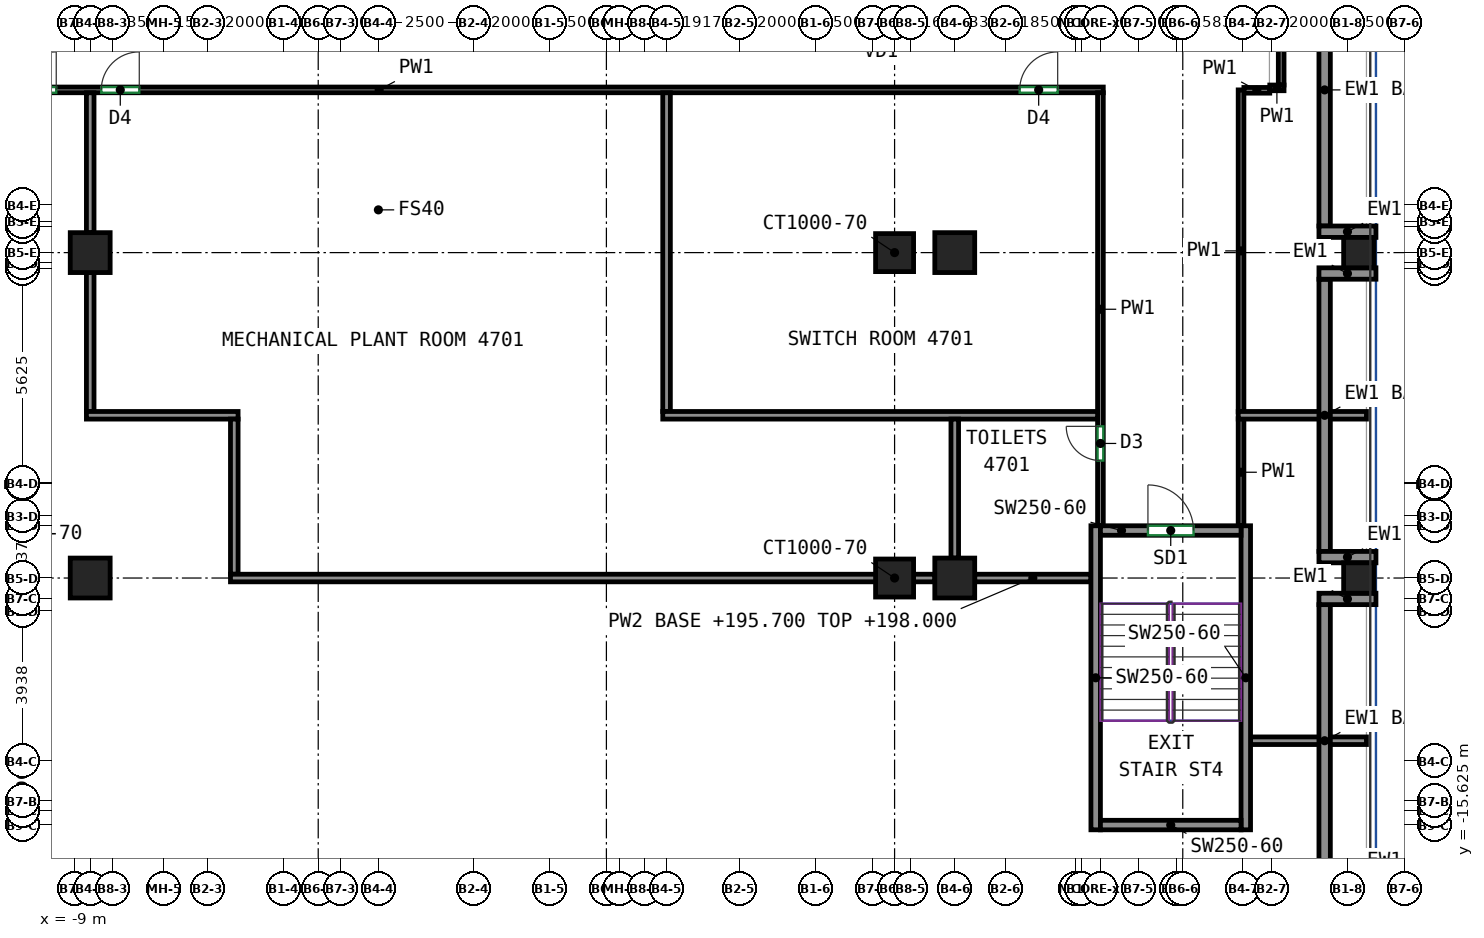
"""IFC4 building model, lengths in metres.
Left out: names, types, materials, properties, quantities, classifications, styles, units other than length and angle.
Written with IfcOpenShell. Run it as: python <this file> out.ifc"""

import sys

from ifc_helpers import new_model, si_unit, direction, frame, frame_2d, origin, origin_2d, place, context, subcontext, project, spatial, rectangle, extrude, source, transform, mapped, element, fill, save


model = new_model("IFC4")
c1 = context("Model", 3, precision=1e-05, world=origin(), true_north=direction((0.0, 1.0)))
c2 = subcontext(c1, "Body", "Model", "MODEL_VIEW")
j1 = project(units=[si_unit("LENGTHUNIT", "METRE"), si_unit("PLANEANGLEUNIT", "RADIAN")], contexts=[c1])
p1 = place(None, origin())
s1 = spatial("IfcSite", under=j1, at=p1, CompositionType="ELEMENT")
p2 = place(p1, origin())
s2 = spatial("IfcBuilding", under=s1, at=p2, CompositionType="ELEMENT")
p3 = place(p2, frame((0.0, 0.0, 195.7)))
s3 = spatial("IfcBuildingStorey", under=s2, at=p3, CompositionType="ELEMENT", Elevation=195.7)
m1 = source(origin(), c2, "Body", "SweptSolid", [
    extrude(rectangle(XDim=1.05, YDim=1.05, at=origin_2d()), origin(), (0.0, 0.0, 1.0), 2.3),
])
for number, where, z_axis, x_axis in (
    (1, (-8.583, -9.125, 0.0), (0.0, 0.0, 1.0), (1.0, 0.0, 0.0)),
    (2, (-8.583, -0.562, 0.0), (0.0, 0.0, 1.0), (1.0, 0.0, 0.0)),
    (3, (14.167, -9.125, 0.0), (0.0, 0.0, 1.0), (1.0, 0.0, 0.0)),
    (4, (14.167, -0.562, 0.0), (0.0, 0.0, 1.0), (1.0, 0.0, 0.0)),
):
    element("IfcColumn", number, at=place(p3, frame(where, z_axis=z_axis, x_axis=x_axis)), inside=s3, PredefinedType="COLUMN", context=c2, shape_type="MappedRepresentation", body=[
        mapped(m1, transform((0.0, 0.0, 0.0))),
    ])
m2 = source(origin(), c2, "Body", "SweptSolid", [
    extrude(rectangle(XDim=0.8, YDim=0.8, at=origin_2d()), origin(), (0.0, 0.0, 1.0), 2.3),
])
for number, where, z_axis, x_axis in (
    (5, (24.8, -9.125, 0.0), (0.0, 0.0, 1.0), (1.0, 0.0, 0.0)),
    (6, (24.8, -0.562, 0.0), (0.0, 0.0, 1.0), (1.0, 0.0, 0.0)),
):
    element("IfcColumn", number, at=place(p3, frame(where, z_axis=z_axis, x_axis=x_axis)), inside=s3, PredefinedType="COLUMN", context=c2, shape_type="MappedRepresentation", body=[
        mapped(m2, transform((0.0, 0.0, 0.0))),
    ])
m3 = source(origin(), c2, "Body", "SweptSolid", [
    extrude(rectangle(XDim=1.0, YDim=1.0, at=origin_2d()), origin(), (0.0, 0.0, 1.0), 3.8),
])
for number, where, z_axis, x_axis in (
    (7, (12.583, -9.125, 0.0), (0.0, 0.0, 1.0), (1.0, 0.0, 0.0)),
    (8, (12.583, -0.562, 0.0), (0.0, 0.0, 1.0), (1.0, 0.0, 0.0)),
):
    element("IfcColumn", number, at=place(p3, frame(where, z_axis=z_axis, x_axis=x_axis)), inside=s3, PredefinedType="COLUMN", context=c2, shape_type="MappedRepresentation", body=[
        mapped(m3, transform((0.0, 0.0, 0.0))),
    ])
m4 = source(origin(), c2, "Body", "SweptSolid", [
    extrude(rectangle(XDim=8.0, YDim=0.25, at=frame_2d((4.0, 0.0))), origin(), (0.0, 0.0, 1.0), 3.8),
])
for number, where, z_axis, x_axis in (
    (9, (17.875, -15.75, 0.0), (0.0, 0.0, 1.0), (0.0, 1.0, 0.0)),
    (10, (21.825, -15.75, 0.0), (0.0, 0.0, 1.0), (0.0, 1.0, 0.0)),
):
    element("IfcWall", number, at=place(p3, frame(where, z_axis=z_axis, x_axis=x_axis)), inside=s3, PredefinedType="SHEAR", context=c2, shape_type="MappedRepresentation", body=[
        mapped(m4, transform((0.0, 0.0, 0.0))),
    ])
m5 = source(origin(), c2, "Body", "SweptSolid", [
    extrude(rectangle(XDim=3.7, YDim=0.25, at=frame_2d((1.85, 0.0))), origin(), (0.0, 0.0, 1.0), 3.8),
])
p4 = place(p3, frame((18.0, -15.625, 0.0), z_axis=(0.0, 0.0, 1.0), x_axis=(1.0, 0.0, 0.0)))
e11 = element("IfcWall", 11, at=p4, inside=s3, PredefinedType="SHEAR", context=c2, shape_type="MappedRepresentation", body=[
    mapped(m5, transform((0.0, 0.0, 0.0))),
])
p5 = place(p3, frame((18.0, -7.875, 0.0), z_axis=(0.0, 0.0, 1.0), x_axis=(1.0, 0.0, 0.0)))
e12 = element("IfcWall", 12, at=p5, inside=s3, PredefinedType="SHEAR", context=c2, shape_type="MappedRepresentation", body=[
    mapped(m5, transform((0.0, 0.0, 0.0))),
])
p6 = place(p5, frame((1.25, 0.0, 0.0)))
e13 = element("IfcOpeningElement", 13, at=p6, cuts=e12, PredefinedType="OPENING", context=c2, shape_type="SweptSolid", body=[
    extrude(rectangle(XDim=1.2, YDim=2.1, at=frame_2d((0.6, 1.05))), frame((0.0, 0.135, 0.0), z_axis=(0.0, -1.0, 0.0), x_axis=(1.0, 0.0, 0.0)), (0.0, 0.0, 1.0), 0.27),
])
m6 = source(origin(), c2, "Body", "SweptSolid", [
    extrude(rectangle(XDim=7.163, YDim=0.3, at=frame_2d((3.581, 0.0))), origin(), (0.0, 0.0, 1.0), 1.1),
])
p7 = place(p3, frame((23.9, -16.988, 0.0), z_axis=(0.0, 0.0, 1.0), x_axis=(0.0, 1.0, 0.0)))
e14 = element("IfcWall", 14, at=p7, inside=s3, PredefinedType="SOLIDWALL", context=c2, shape_type="MappedRepresentation", body=[
    mapped(m6, transform((0.0, 0.0, 0.0))),
])
m7 = source(origin(), c2, "Body", "SweptSolid", [
    extrude(rectangle(XDim=1.5, YDim=0.3, at=frame_2d((0.75, 0.0))), origin(), (0.0, 0.0, 1.0), 2.3),
])
p8 = place(p3, frame((25.25, -9.675, 0.0), z_axis=(0.0, 0.0, 1.0), x_axis=(-1.0, 0.0, 0.0)))
e15 = element("IfcWall", 15, at=p8, inside=s3, PredefinedType="SOLIDWALL", context=c2, shape_type="MappedRepresentation", body=[
    mapped(m7, transform((0.0, 0.0, 0.0))),
])
p9 = place(p3, frame((23.9, -8.425, 0.0), z_axis=(0.0, 0.0, 1.0), x_axis=(0.0, 1.0, 0.0)))
e16 = element("IfcWall", 16, at=p9, inside=s3, PredefinedType="SOLIDWALL", context=c2, shape_type="MappedRepresentation", body=[
    mapped(m6, transform((0.0, 0.0, 0.0))),
])
for number, where, z_axis, x_axis in (
    (17, (25.25, -8.575, 0.0), (0.0, 0.0, 1.0), (-1.0, 0.0, 0.0)),
    (18, (25.25, -1.113, 0.0), (0.0, 0.0, 1.0), (-1.0, 0.0, 0.0)),
):
    element("IfcWall", number, at=place(p3, frame(where, z_axis=z_axis, x_axis=x_axis)), inside=s3, PredefinedType="SOLIDWALL", context=c2, shape_type="MappedRepresentation", body=[
        mapped(m7, transform((0.0, 0.0, 0.0))),
    ])
p10 = place(p3, frame((23.9, 0.137, 0.0), z_axis=(0.0, 0.0, 1.0), x_axis=(0.0, 1.0, 0.0)))
e19 = element("IfcWall", 19, at=p10, inside=s3, PredefinedType="SOLIDWALL", context=c2, shape_type="MappedRepresentation", body=[
    mapped(m6, transform((0.0, 0.0, 0.0))),
])
p11 = place(p3, frame((25.25, -0.012, 0.0), z_axis=(0.0, 0.0, 1.0), x_axis=(-1.0, 0.0, 0.0)))
e20 = element("IfcWall", 20, at=p11, inside=s3, PredefinedType="SOLIDWALL", context=c2, shape_type="MappedRepresentation", body=[
    mapped(m7, transform((0.0, 0.0, 0.0))),
])
p12 = place(p3, frame((-20.034, 3.719, 0.0), z_axis=(0.0, 0.0, 1.0), x_axis=(1.0, 0.0, 0.0)))
e21 = element("IfcWall", 21, at=p12, inside=s3, PredefinedType="PARTITIONING", context=c2, shape_type="SweptSolid", body=[
    extrude(rectangle(XDim=38.109, YDim=0.15, at=frame_2d((19.054, 0.0))), origin(), (0.0, 0.0, 1.0), 3.8),
])
p13 = place(p12, frame((9.557, 0.0, 0.0)))
e22 = element("IfcOpeningElement", 22, at=p13, cuts=e21, PredefinedType="OPENING", context=c2, shape_type="SweptSolid", body=[
    extrude(rectangle(XDim=1.0, YDim=2.1, at=frame_2d((0.5, 1.05))), frame((0.0, 0.085, 0.0), z_axis=(0.0, -1.0, 0.0), x_axis=(1.0, 0.0, 0.0)), (0.0, 0.0, 1.0), 0.17),
])
p14 = place(p12, frame((11.742, 0.0, 0.0)))
e23 = element("IfcOpeningElement", 23, at=p14, cuts=e21, PredefinedType="OPENING", context=c2, shape_type="SweptSolid", body=[
    extrude(rectangle(XDim=1.0, YDim=2.1, at=frame_2d((0.5, 1.05))), frame((0.0, 0.085, 0.0), z_axis=(0.0, -1.0, 0.0), x_axis=(1.0, 0.0, 0.0)), (0.0, 0.0, 1.0), 0.17),
])
p15 = place(p12, frame((35.909, 0.0, 0.0)))
e24 = element("IfcOpeningElement", 24, at=p15, cuts=e21, PredefinedType="OPENING", context=c2, shape_type="SweptSolid", body=[
    extrude(rectangle(XDim=1.0, YDim=2.1, at=frame_2d((0.5, 1.05))), frame((0.0, 0.085, 0.0), z_axis=(0.0, -1.0, 0.0), x_axis=(1.0, 0.0, 0.0)), (0.0, 0.0, 1.0), 0.17),
])
p16 = place(p3, frame((21.7, -7.75, 0.0), z_axis=(0.0, 0.0, 1.0), x_axis=(0.0, 1.0, 0.0)))
e25 = element("IfcWall", 25, at=p16, inside=s3, PredefinedType="PARTITIONING", context=c2, shape_type="SweptSolid", body=[
    extrude(rectangle(XDim=2.817, YDim=0.15, at=frame_2d((1.408, 0.0))), origin(), (0.0, 0.0, 1.0), 3.8),
])
p17 = place(p3, frame((18.0, -7.75, 0.0), z_axis=(0.0, 0.0, 1.0), x_axis=(0.0, 1.0, 0.0)))
e26 = element("IfcWall", 26, at=p17, inside=s3, PredefinedType="PARTITIONING", context=c2, shape_type="SweptSolid", body=[
    extrude(rectangle(XDim=11.394, YDim=0.15, at=frame_2d((5.697, 0.0))), origin(), (0.0, 0.0, 1.0), 3.8),
])
p18 = place(p17, frame((1.716, 0.0, 0.0)))
e27 = element("IfcOpeningElement", 27, at=p18, cuts=e26, PredefinedType="OPENING", context=c2, shape_type="SweptSolid", body=[
    extrude(rectangle(XDim=0.9, YDim=2.1, at=frame_2d((0.45, 1.05))), frame((0.0, 0.085, 0.0), z_axis=(0.0, -1.0, 0.0), x_axis=(1.0, 0.0, 0.0)), (0.0, 0.0, 1.0), 0.17),
])
p19 = place(p3, frame((21.775, 3.708, 0.0), z_axis=(0.0, 0.0, 1.0), x_axis=(1.0, 0.0, 0.0)))
e28 = element("IfcWall", 28, at=p19, inside=s3, PredefinedType="PARTITIONING", context=c2, shape_type="SweptSolid", body=[
    extrude(rectangle(XDim=0.681, YDim=0.15, at=frame_2d((0.341, 0.0))), origin(), (0.0, 0.0, 1.0), 3.8),
])
p20 = place(p3, frame((21.7, -4.753, 0.0), z_axis=(0.0, 0.0, 1.0), x_axis=(0.0, 1.0, 0.0)))
e29 = element("IfcWall", 29, at=p20, inside=s3, PredefinedType="PARTITIONING", context=c2, shape_type="SweptSolid", body=[
    extrude(rectangle(XDim=8.472, YDim=0.15, at=frame_2d((4.236, 0.0))), origin(), (0.0, 0.0, 1.0), 3.8),
])
p21 = place(p3, frame((22.756, 3.847, 0.0), z_axis=(0.0, 0.0, 1.0), x_axis=(0.0, 1.0, 0.0)))
e30 = element("IfcWall", 30, at=p21, inside=s3, PredefinedType="PARTITIONING", context=c2, shape_type="SweptSolid", body=[
    extrude(rectangle(XDim=5.95, YDim=0.15, at=frame_2d((2.975, 0.0))), origin(), (0.0, 0.0, 1.0), 3.8),
])
p22 = place(p3, frame((22.456, 3.772, 0.0), z_axis=(0.0, 0.0, 1.0), x_axis=(1.0, 0.0, 0.0)))
e31 = element("IfcWall", 31, at=p22, inside=s3, PredefinedType="PARTITIONING", context=c2, shape_type="SweptSolid", body=[
    extrude(rectangle(XDim=0.375, YDim=0.15, at=frame_2d((0.188, 0.0))), origin(), (0.0, 0.0, 1.0), 3.8),
])
p23 = place(p3, frame((-8.583, -0.037, 0.0), z_axis=(0.0, 0.0, 1.0), x_axis=(0.0, 1.0, 0.0)))
e32 = element("IfcWall", 32, at=p23, inside=s3, PredefinedType="PARTITIONING", context=c2, shape_type="SweptSolid", body=[
    extrude(rectangle(XDim=3.68, YDim=0.2, at=frame_2d((1.84, 0.0))), origin(), (0.0, 0.0, 1.0), 3.8),
])
p24 = place(p3, frame((-8.583, -4.743, 0.0), z_axis=(0.0, 0.0, 1.0), x_axis=(0.0, 1.0, 0.0)))
e33 = element("IfcWall", 33, at=p24, inside=s3, PredefinedType="PARTITIONING", context=c2, shape_type="SweptSolid", body=[
    extrude(rectangle(XDim=3.656, YDim=0.2, at=frame_2d((1.828, 0.0))), origin(), (0.0, 0.0, 1.0), 3.8),
])
p25 = place(p3, frame((-8.683, -4.843, 0.0), z_axis=(0.0, 0.0, 1.0), x_axis=(1.0, 0.0, 0.0)))
e34 = element("IfcWall", 34, at=p25, inside=s3, PredefinedType="PARTITIONING", context=c2, shape_type="SweptSolid", body=[
    extrude(rectangle(XDim=3.991, YDim=0.2, at=frame_2d((1.996, 0.0))), origin(), (0.0, 0.0, 1.0), 3.8),
])
p26 = place(p3, frame((-4.792, -9.025, 0.0), z_axis=(0.0, 0.0, 1.0), x_axis=(0.0, 1.0, 0.0)))
e35 = element("IfcWall", 35, at=p26, inside=s3, PredefinedType="PARTITIONING", context=c2, shape_type="SweptSolid", body=[
    extrude(rectangle(XDim=4.082, YDim=0.2, at=frame_2d((2.041, 0.0))), origin(), (0.0, 0.0, 1.0), 3.8),
])
p27 = place(p3, frame((-4.892, -9.125, 0.0), z_axis=(0.0, 0.0, 1.0), x_axis=(1.0, 0.0, 0.0)))
e36 = element("IfcWall", 36, at=p27, inside=s3, PredefinedType="PARTITIONING", context=c2, shape_type="SweptSolid", body=[
    extrude(rectangle(XDim=18.534, YDim=0.2, at=frame_2d((9.267, 0.0))), origin(), (0.0, 0.0, 1.0), 3.8),
])
p28 = place(p3, frame((14.692, -9.125, 0.0), z_axis=(0.0, 0.0, 1.0), x_axis=(1.0, 0.0, 0.0)))
e37 = element("IfcWall", 37, at=p28, inside=s3, PredefinedType="PARTITIONING", context=c2, shape_type="SweptSolid", body=[
    extrude(rectangle(XDim=3.058, YDim=0.2, at=frame_2d((1.529, 0.0))), origin(), (0.0, 0.0, 1.0), 2.3),
])
p29 = place(p3, frame((25.0, -13.406, 0.0), z_axis=(0.0, 0.0, 1.0), x_axis=(-1.0, 0.0, 0.0)))
e38 = element("IfcWall", 38, at=p29, inside=s3, PredefinedType="PARTITIONING", context=c2, shape_type="SweptSolid", body=[
    extrude(rectangle(XDim=0.98, YDim=0.2, at=frame_2d((0.49, 0.0))), origin(), (0.0, 0.0, 1.0), 3.8),
])
p30 = place(p3, frame((23.78, -13.406, 0.0), z_axis=(0.0, 0.0, 1.0), x_axis=(-1.0, 0.0, 0.0)))
e39 = element("IfcWall", 39, at=p30, inside=s3, PredefinedType="PARTITIONING", context=c2, shape_type="SweptSolid", body=[
    extrude(rectangle(XDim=1.83, YDim=0.2, at=frame_2d((0.915, 0.0))), origin(), (0.0, 0.0, 1.0), 3.8),
])
p31 = place(p3, frame((6.583, -4.743, 0.0), z_axis=(0.0, 0.0, 1.0), x_axis=(0.0, 1.0, 0.0)))
e40 = element("IfcWall", 40, at=p31, inside=s3, PredefinedType="PARTITIONING", context=c2, shape_type="SweptSolid", body=[
    extrude(rectangle(XDim=8.386, YDim=0.2, at=frame_2d((4.193, 0.0))), origin(), (0.0, 0.0, 1.0), 3.8),
])
p32 = place(p3, frame((6.483, -4.843, 0.0), z_axis=(0.0, 0.0, 1.0), x_axis=(1.0, 0.0, 0.0)))
e41 = element("IfcWall", 41, at=p32, inside=s3, PredefinedType="PARTITIONING", context=c2, shape_type="SweptSolid", body=[
    extrude(rectangle(XDim=11.442, YDim=0.2, at=frame_2d((5.721, 0.0))), origin(), (0.0, 0.0, 1.0), 3.8),
])
p33 = place(p3, frame((14.167, -8.6, 0.0), z_axis=(0.0, 0.0, 1.0), x_axis=(0.0, 1.0, 0.0)))
e42 = element("IfcWall", 42, at=p33, inside=s3, PredefinedType="PARTITIONING", context=c2, shape_type="SweptSolid", body=[
    extrude(rectangle(XDim=3.657, YDim=0.2, at=frame_2d((1.829, 0.0))), origin(), (0.0, 0.0, 1.0), 3.8),
])
p34 = place(p3, frame((21.626, -4.843, 0.0), z_axis=(0.0, 0.0, 1.0), x_axis=(1.0, 0.0, 0.0)))
e43 = element("IfcWall", 43, at=p34, inside=s3, PredefinedType="PARTITIONING", context=c2, shape_type="SweptSolid", body=[
    extrude(rectangle(XDim=2.154, YDim=0.2, at=frame_2d((1.077, 0.0))), origin(), (0.0, 0.0, 1.0), 3.8),
])
p35 = place(p3, frame((24.02, -4.843, 0.0), z_axis=(0.0, 0.0, 1.0), x_axis=(1.0, 0.0, 0.0)))
e44 = element("IfcWall", 44, at=p35, inside=s3, PredefinedType="PARTITIONING", context=c2, shape_type="SweptSolid", body=[
    extrude(rectangle(XDim=0.98, YDim=0.2, at=frame_2d((0.49, 0.0))), origin(), (0.0, 0.0, 1.0), 3.8),
])
p36 = place(p6, origin())
e45 = element("IfcDoor", 45, at=p36, inside=s3, OperationType="DOUBLE_DOOR_SINGLE_SWING", PredefinedType="DOOR", context=c2, shape_type="SweptSolid", body=[
    extrude(rectangle(XDim=1.2, YDim=2.1, at=frame_2d((0.6, 1.05))), frame((0.0, 0.025, 0.0), z_axis=(0.0, -1.0, 0.0), x_axis=(1.0, 0.0, 0.0)), (0.0, 0.0, 1.0), 0.05),
])
fill(e13, e45)
p37 = place(p18, origin())
e46 = element("IfcDoor", 46, at=p37, inside=s3, OperationType="SINGLE_SWING_RIGHT", PredefinedType="DOOR", context=c2, shape_type="SweptSolid", body=[
    extrude(rectangle(XDim=0.9, YDim=2.1, at=frame_2d((0.45, 1.05))), frame((0.0, 0.025, 0.0), z_axis=(0.0, -1.0, 0.0), x_axis=(1.0, 0.0, 0.0)), (0.0, 0.0, 1.0), 0.05),
])
fill(e27, e46)
p38 = place(p13, origin())
e47 = element("IfcDoor", 47, at=p38, inside=s3, OperationType="SINGLE_SWING_RIGHT", PredefinedType="DOOR", context=c2, shape_type="SweptSolid", body=[
    extrude(rectangle(XDim=1.0, YDim=2.1, at=frame_2d((0.5, 1.05))), frame((0.0, 0.025, 0.0), z_axis=(0.0, -1.0, 0.0), x_axis=(1.0, 0.0, 0.0)), (0.0, 0.0, 1.0), 0.05),
])
fill(e22, e47)
p39 = place(p14, origin())
e48 = element("IfcDoor", 48, at=p39, inside=s3, OperationType="SINGLE_SWING_RIGHT", PredefinedType="DOOR", context=c2, shape_type="SweptSolid", body=[
    extrude(rectangle(XDim=1.0, YDim=2.1, at=frame_2d((0.5, 1.05))), frame((0.0, 0.025, 0.0), z_axis=(0.0, -1.0, 0.0), x_axis=(1.0, 0.0, 0.0)), (0.0, 0.0, 1.0), 0.05),
])
fill(e23, e48)
p40 = place(p15, origin())
e49 = element("IfcDoor", 49, at=p40, inside=s3, OperationType="SINGLE_SWING_RIGHT", PredefinedType="DOOR", context=c2, shape_type="SweptSolid", body=[
    extrude(rectangle(XDim=1.0, YDim=2.1, at=frame_2d((0.5, 1.05))), frame((0.0, 0.025, 0.0), z_axis=(0.0, -1.0, 0.0), x_axis=(1.0, 0.0, 0.0)), (0.0, 0.0, 1.0), 0.05),
])
fill(e24, e49)
save(model, sys.argv[1])
